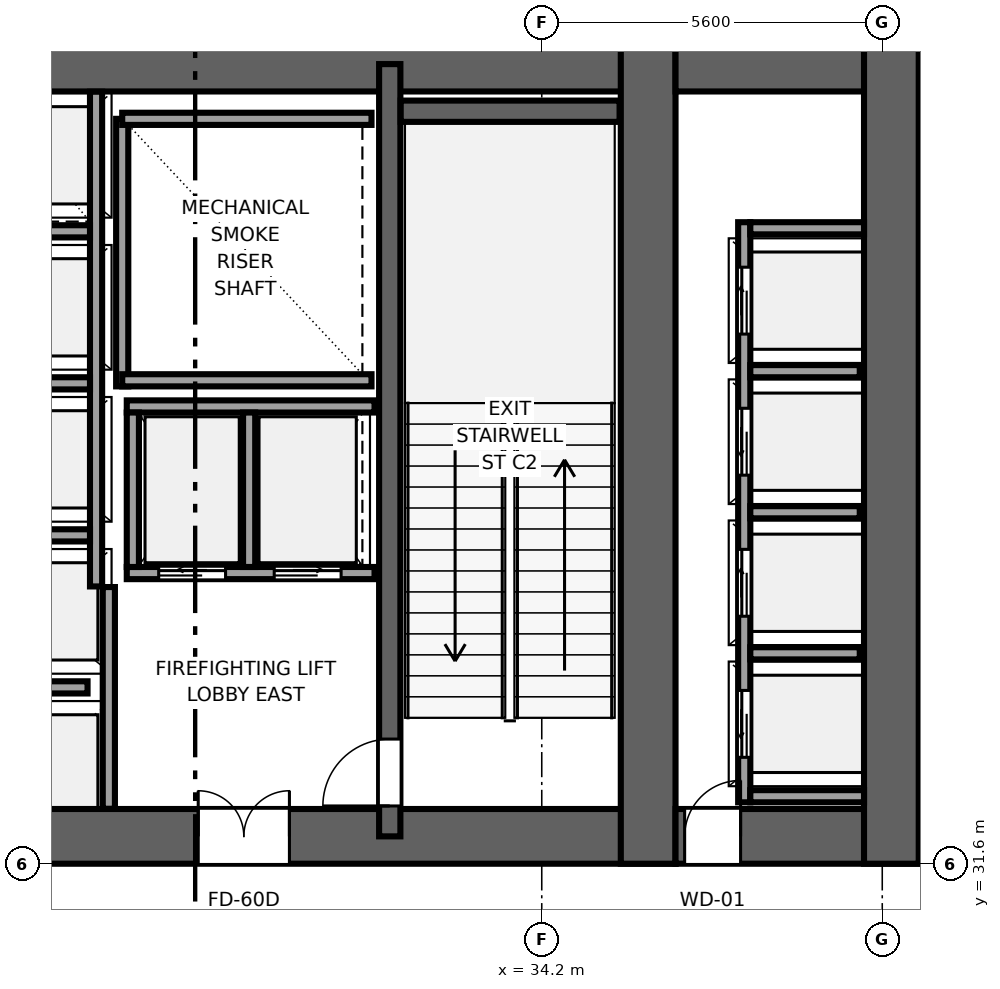
"""IFC4 building model, lengths in metres.
Left out: names, types, materials, properties, quantities, classifications, styles, units other than length and angle.
Written with IfcOpenShell. Run it as: python <this file> out.ifc"""

import sys

from ifc_helpers import new_model, si_unit, direction, frame, frame_2d, origin, place, context, subcontext, project, spatial, rectangle, extrude, source, transform, mapped, element, fill, save


model = new_model("IFC4")
c1 = context("Model", 3, precision=1e-05, world=origin(), true_north=direction((0.0, 1.0)))
c2 = subcontext(c1, "Body", "Model", "MODEL_VIEW")
j1 = project(units=[si_unit("LENGTHUNIT", "METRE"), si_unit("PLANEANGLEUNIT", "RADIAN")], contexts=[c1])
p1 = place(None, origin())
s1 = spatial("IfcSite", under=j1, at=p1, CompositionType="ELEMENT")
p2 = place(p1, origin())
s2 = spatial("IfcBuilding", under=s1, at=p2, CompositionType="ELEMENT")
p3 = place(p2, origin())
s3 = spatial("IfcBuildingStorey", under=s2, at=p3, CompositionType="ELEMENT", Elevation=0.0)
p4 = place(p3, frame((9.6, 32.05, 0.0), z_axis=(0.0, 0.0, 1.0), x_axis=(1.0, 0.0, 0.0)))
e1 = element("IfcWall", 1, at=p4, inside=s3, PredefinedType="SHEAR", context=c2, shape_type="SweptSolid", body=[
    extrude(rectangle(XDim=26.8, YDim=0.9, at=frame_2d((13.4, 0.0))), origin(), (0.0, 0.0, 1.0), 6.0),
])
p5 = place(p4, frame((7.85, 0.0, 0.0), z_axis=(0.0, 0.0, 1.0), x_axis=(-1.0, 0.0, 0.0)))
e2 = element("IfcOpeningElement", 2, at=p5, cuts=e1, PredefinedType="OPENING", context=c2, shape_type="SweptSolid", body=[
    extrude(rectangle(XDim=1.5, YDim=2.04, at=frame_2d((0.75, 1.02))), frame((0.0, 0.46, 0.0), z_axis=(0.0, -1.0, 0.0), x_axis=(1.0, 0.0, 0.0)), (0.0, 0.0, 1.0), 0.92),
])
p6 = place(p4, frame((14.15, 0.0, 0.0), z_axis=(0.0, 0.0, 1.0), x_axis=(-1.0, 0.0, 0.0)))
e3 = element("IfcOpeningElement", 3, at=p6, cuts=e1, PredefinedType="OPENING", context=c2, shape_type="SweptSolid", body=[
    extrude(rectangle(XDim=1.5, YDim=2.04, at=frame_2d((0.75, 1.02))), frame((0.0, 0.46, 0.0), z_axis=(0.0, -1.0, 0.0), x_axis=(1.0, 0.0, 0.0)), (0.0, 0.0, 1.0), 0.92),
])
p7 = place(p4, frame((20.45, 0.0, 0.0), z_axis=(0.0, 0.0, 1.0), x_axis=(-1.0, 0.0, 0.0)))
e4 = element("IfcOpeningElement", 4, at=p7, cuts=e1, PredefinedType="OPENING", context=c2, shape_type="SweptSolid", body=[
    extrude(rectangle(XDim=1.5, YDim=2.04, at=frame_2d((0.75, 1.02))), frame((0.0, 0.46, 0.0), z_axis=(0.0, -1.0, 0.0), x_axis=(1.0, 0.0, 0.0)), (0.0, 0.0, 1.0), 0.92),
])
p8 = place(p3, frame((9.6, 44.75, 0.0), z_axis=(0.0, 0.0, 1.0), x_axis=(1.0, 0.0, 0.0)))
e5 = element("IfcWall", 5, at=p8, inside=s3, PredefinedType="SHEAR", context=c2, shape_type="SweptSolid", body=[
    extrude(rectangle(XDim=26.8, YDim=0.9, at=frame_2d((13.4, 0.0))), origin(), (0.0, 0.0, 1.0), 6.0),
])
p9 = place(p3, frame((35.95, 31.6, 0.0), z_axis=(0.0, 0.0, 1.0), x_axis=(0.0, 1.0, 0.0)))
e6 = element("IfcWall", 6, at=p9, inside=s3, PredefinedType="SHEAR", context=c2, shape_type="SweptSolid", body=[
    extrude(rectangle(XDim=13.6, YDim=0.9, at=frame_2d((6.8, 0.0))), origin(), (0.0, 0.0, 1.0), 6.0),
])
p10 = place(p3, frame((31.7, 32.05, 0.0), z_axis=(0.0, 0.0, 1.0), x_axis=(0.0, 1.0, 0.0)))
e7 = element("IfcWall", 7, at=p10, inside=s3, PredefinedType="SHEAR", context=c2, shape_type="SweptSolid", body=[
    extrude(rectangle(XDim=12.7, YDim=0.35, at=frame_2d((6.35, 0.0))), origin(), (0.0, 0.0, 1.0), 6.0),
])
p11 = place(p10, frame((0.5, 0.0, 0.0)))
e8 = element("IfcOpeningElement", 8, at=p11, cuts=e7, PredefinedType="OPENING", context=c2, shape_type="SweptSolid", body=[
    extrude(rectangle(XDim=1.1, YDim=2.12, at=frame_2d((0.55, 1.06))), frame((0.0, 0.185, 0.0), z_axis=(0.0, -1.0, 0.0), x_axis=(1.0, 0.0, 0.0)), (0.0, 0.0, 1.0), 0.37),
])
p12 = place(p3, frame((36.4, 32.05, 0.0), z_axis=(0.0, 0.0, 1.0), x_axis=(1.0, 0.0, 0.0)))
e9 = element("IfcWall", 9, at=p12, inside=s3, PredefinedType="SHEAR", context=c2, shape_type="SweptSolid", body=[
    extrude(rectangle(XDim=4.0, YDim=0.9, at=frame_2d((2.0, 0.0))), origin(), (0.0, 0.0, 1.0), 6.0),
])
p13 = place(p12, frame((1.07, 0.0, 0.0), z_axis=(0.0, 0.0, 1.0), x_axis=(-1.0, 0.0, 0.0)))
e10 = element("IfcOpeningElement", 10, at=p13, cuts=e9, PredefinedType="OPENING", context=c2, shape_type="SweptSolid", body=[
    extrude(rectangle(XDim=0.92, YDim=2.01, at=frame_2d((0.46, 1.005))), frame((0.0, 0.46, 0.0), z_axis=(0.0, -1.0, 0.0), x_axis=(1.0, 0.0, 0.0)), (0.0, 0.0, 1.0), 0.92),
])
p14 = place(p3, frame((36.4, 44.75, 0.0), z_axis=(0.0, 0.0, 1.0), x_axis=(1.0, 0.0, 0.0)))
e11 = element("IfcWall", 11, at=p14, inside=s3, PredefinedType="SHEAR", context=c2, shape_type="SweptSolid", body=[
    extrude(rectangle(XDim=4.0, YDim=0.9, at=frame_2d((2.0, 0.0))), origin(), (0.0, 0.0, 1.0), 6.0),
])
p15 = place(p3, frame((39.95, 31.6, 0.0), z_axis=(0.0, 0.0, 1.0), x_axis=(0.0, 1.0, 0.0)))
e12 = element("IfcWall", 12, at=p15, inside=s3, PredefinedType="SHEAR", context=c2, shape_type="SweptSolid", body=[
    extrude(rectangle(XDim=13.6, YDim=0.9, at=frame_2d((6.8, 0.0))), origin(), (0.0, 0.0, 1.0), 6.0),
])
p16 = place(p3, frame((31.88, 43.975, 0.0), z_axis=(0.0, 0.0, 1.0), x_axis=(1.0, 0.0, 0.0)))
e13 = element("IfcWall", 13, at=p16, inside=s3, PredefinedType="SHEAR", context=c2, shape_type="SweptSolid", body=[
    extrude(rectangle(XDim=3.6, YDim=0.35, at=frame_2d((1.8, 0.0))), origin(), (0.0, 0.0, 1.0), 6.0),
])
p17 = place(p3, frame((27.3, 39.45, 0.0), z_axis=(0.0, 0.0, 1.0), x_axis=(0.0, 1.0, 0.0)))
e14 = element("IfcWall", 14, at=p17, inside=s3, PredefinedType="SOLIDWALL", context=c2, shape_type="SweptSolid", body=[
    extrude(rectangle(XDim=4.4, YDim=0.2, at=frame_2d((2.2, 0.0))), origin(), (0.0, 0.0, 1.0), 5.74),
])
for number, where, z_axis, x_axis in (
    (15, (27.3, 39.55, 0.0), (0.0, 0.0, 1.0), (1.0, 0.0, 0.0)),
    (16, (27.3, 43.85, 0.0), (0.0, 0.0, 1.0), (1.0, 0.0, 0.0)),
):
    element("IfcWall", number, at=place(p3, frame(where, z_axis=z_axis, x_axis=x_axis)), inside=s3, PredefinedType="SOLIDWALL", context=c2, shape_type="SweptSolid", body=[
        extrude(rectangle(XDim=4.1, YDim=0.2, at=frame_2d((2.05, 0.0))), origin(), (0.0, 0.0, 1.0), 5.74),
    ])
p18 = place(p3, frame((27.08, 32.504, 0.0), z_axis=(0.0, 0.0, 1.0), x_axis=(0.0, 1.0, 0.0)))
e17 = element("IfcWall", 17, at=p18, inside=s3, PredefinedType="SOLIDWALL", context=c2, shape_type="SweptSolid", body=[
    extrude(rectangle(XDim=3.646, YDim=0.2, at=frame_2d((1.823, 0.0))), origin(), (0.0, 0.0, 1.0), 5.74),
])
p19 = place(p3, frame((27.375, 36.38, 0.0), z_axis=(0.0, 0.0, 1.0), x_axis=(1.0, 0.0, 0.0)))
e18 = element("IfcWall", 18, at=p19, inside=s3, PredefinedType="SOLIDWALL", context=c2, shape_type="SweptSolid", body=[
    extrude(rectangle(XDim=4.075, YDim=0.2, at=frame_2d((2.038, 0.0))), origin(), (0.0, 0.0, 1.0), 5.74),
])
p20 = place(p19, frame((0.525, 0.0, 0.0)))
e19 = element("IfcOpeningElement", 19, at=p20, cuts=e18, PredefinedType="OPENING", context=c2, shape_type="SweptSolid", body=[
    extrude(rectangle(XDim=1.1, YDim=2.12, at=frame_2d((0.55, 1.06))), frame((0.0, 0.11, 0.0), z_axis=(0.0, -1.0, 0.0), x_axis=(1.0, 0.0, 0.0)), (0.0, 0.0, 1.0), 0.22),
])
p21 = place(p19, frame((2.425, 0.0, 0.0)))
e20 = element("IfcOpeningElement", 20, at=p21, cuts=e18, PredefinedType="OPENING", context=c2, shape_type="SweptSolid", body=[
    extrude(rectangle(XDim=1.1, YDim=2.12, at=frame_2d((0.55, 1.06))), frame((0.0, 0.11, 0.0), z_axis=(0.0, -1.0, 0.0), x_axis=(1.0, 0.0, 0.0)), (0.0, 0.0, 1.0), 0.22),
])
p22 = place(p3, frame((27.375, 39.12, 0.0), z_axis=(0.0, 0.0, 1.0), x_axis=(1.0, 0.0, 0.0)))
e21 = element("IfcWall", 21, at=p22, inside=s3, PredefinedType="SOLIDWALL", context=c2, shape_type="SweptSolid", body=[
    extrude(rectangle(XDim=4.075, YDim=0.2, at=frame_2d((2.038, 0.0))), origin(), (0.0, 0.0, 1.0), 5.74),
])
for number, where, z_axis, x_axis in (
    (22, (27.475, 36.48, 0.0), (0.0, 0.0, 1.0), (0.0, 1.0, 0.0)),
    (23, (29.387, 36.48, 0.0), (0.0, 0.0, 1.0), (0.0, 1.0, 0.0)),
):
    element("IfcWall", number, at=place(p3, frame(where, z_axis=z_axis, x_axis=x_axis)), inside=s3, PredefinedType="SOLIDWALL", context=c2, shape_type="SweptSolid", body=[
        extrude(rectangle(XDim=2.54, YDim=0.2, at=frame_2d((1.27, 0.0))), origin(), (0.0, 0.0, 1.0), 5.74),
    ])
p23 = place(p3, frame((26.87, 36.16, 0.0), z_axis=(0.0, 0.0, 1.0), x_axis=(0.0, 1.0, 0.0)))
e24 = element("IfcWall", 24, at=p23, inside=s3, PredefinedType="SOLIDWALL", context=c2, shape_type="SweptSolid", body=[
    extrude(rectangle(XDim=8.136, YDim=0.2, at=frame_2d((4.068, 0.0))), origin(), (0.0, 0.0, 1.0), 5.74),
])
p24 = place(p3, frame((24.93, 34.5, 0.0), z_axis=(0.0, 0.0, 1.0), x_axis=(1.0, 0.0, 0.0)))
e25 = element("IfcWall", 25, at=p24, inside=s3, PredefinedType="SOLIDWALL", context=c2, shape_type="SweptSolid", body=[
    extrude(rectangle(XDim=1.8, YDim=0.2, at=frame_2d((0.9, 0.0))), origin(), (0.0, 0.0, 1.0), 5.74),
])
for number, where, z_axis, x_axis in (
    (26, (24.93, 37.0, 0.0), (0.0, 0.0, 1.0), (1.0, 0.0, 0.0)),
    (27, (24.93, 39.5, 0.0), (0.0, 0.0, 1.0), (1.0, 0.0, 0.0)),
    (28, (24.93, 42.0, 0.0), (0.0, 0.0, 1.0), (1.0, 0.0, 0.0)),
):
    element("IfcWall", number, at=place(p3, frame(where, z_axis=z_axis, x_axis=x_axis)), inside=s3, PredefinedType="SOLIDWALL", context=c2, shape_type="SweptSolid", body=[
        extrude(rectangle(XDim=1.84, YDim=0.2, at=frame_2d((0.92, 0.0))), origin(), (0.0, 0.0, 1.0), 5.74),
    ])
p25 = place(p3, frame((37.53, 32.61, 0.0), z_axis=(0.0, 0.0, 1.0), x_axis=(0.0, 1.0, 0.0)))
e29 = element("IfcWall", 29, at=p25, inside=s3, PredefinedType="SOLIDWALL", context=c2, shape_type="SweptSolid", body=[
    extrude(rectangle(XDim=9.54, YDim=0.2, at=frame_2d((4.77, 0.0))), origin(), (0.0, 0.0, 1.0), 5.74),
])
p26 = place(p25, frame((0.74, 0.0, 0.0)))
e30 = element("IfcOpeningElement", 30, at=p26, cuts=e29, PredefinedType="OPENING", context=c2, shape_type="SweptSolid", body=[
    extrude(rectangle(XDim=1.1, YDim=2.12, at=frame_2d((0.55, 1.06))), frame((0.0, 0.11, 0.0), z_axis=(0.0, -1.0, 0.0), x_axis=(1.0, 0.0, 0.0)), (0.0, 0.0, 1.0), 0.22),
])
p27 = place(p25, frame((3.06, 0.0, 0.0)))
e31 = element("IfcOpeningElement", 31, at=p27, cuts=e29, PredefinedType="OPENING", context=c2, shape_type="SweptSolid", body=[
    extrude(rectangle(XDim=1.1, YDim=2.12, at=frame_2d((0.55, 1.06))), frame((0.0, 0.11, 0.0), z_axis=(0.0, -1.0, 0.0), x_axis=(1.0, 0.0, 0.0)), (0.0, 0.0, 1.0), 0.22),
])
p28 = place(p25, frame((5.38, 0.0, 0.0)))
e32 = element("IfcOpeningElement", 32, at=p28, cuts=e29, PredefinedType="OPENING", context=c2, shape_type="SweptSolid", body=[
    extrude(rectangle(XDim=1.1, YDim=2.12, at=frame_2d((0.55, 1.06))), frame((0.0, 0.11, 0.0), z_axis=(0.0, -1.0, 0.0), x_axis=(1.0, 0.0, 0.0)), (0.0, 0.0, 1.0), 0.22),
])
p29 = place(p25, frame((7.7, 0.0, 0.0)))
e33 = element("IfcOpeningElement", 33, at=p29, cuts=e29, PredefinedType="OPENING", context=c2, shape_type="SweptSolid", body=[
    extrude(rectangle(XDim=1.1, YDim=2.12, at=frame_2d((0.55, 1.06))), frame((0.0, 0.11, 0.0), z_axis=(0.0, -1.0, 0.0), x_axis=(1.0, 0.0, 0.0)), (0.0, 0.0, 1.0), 0.22),
])
for number, where, z_axis, x_axis in (
    (34, (37.63, 32.71, 0.0), (0.0, 0.0, 1.0), (1.0, 0.0, 0.0)),
    (35, (37.63, 42.05, 0.0), (0.0, 0.0, 1.0), (1.0, 0.0, 0.0)),
):
    element("IfcWall", number, at=place(p3, frame(where, z_axis=z_axis, x_axis=x_axis)), inside=s3, PredefinedType="SOLIDWALL", context=c2, shape_type="SweptSolid", body=[
        extrude(rectangle(XDim=1.87, YDim=0.2, at=frame_2d((0.935, 0.0))), origin(), (0.0, 0.0, 1.0), 5.74),
    ])
for number, where, z_axis, x_axis in (
    (36, (37.63, 35.06, 0.0), (0.0, 0.0, 1.0), (1.0, 0.0, 0.0)),
    (37, (37.63, 37.38, 0.0), (0.0, 0.0, 1.0), (1.0, 0.0, 0.0)),
    (38, (37.63, 39.7, 0.0), (0.0, 0.0, 1.0), (1.0, 0.0, 0.0)),
):
    element("IfcWall", number, at=place(p3, frame(where, z_axis=z_axis, x_axis=x_axis)), inside=s3, PredefinedType="SOLIDWALL", context=c2, shape_type="SweptSolid", body=[
        extrude(rectangle(XDim=1.8, YDim=0.2, at=frame_2d((0.9, 0.0))), origin(), (0.0, 0.0, 1.0), 5.74),
    ])
m1 = source(origin(), c2, "Body", "SweptSolid", [
    extrude(rectangle(XDim=1.1, YDim=2.12, at=frame_2d((0.55, 1.06))), frame((0.0, 0.025, 0.0), z_axis=(0.0, -1.0, 0.0), x_axis=(1.0, 0.0, 0.0)), (0.0, 0.0, 1.0), 0.05),
])
p30 = place(p11, origin())
e39 = element("IfcDoor", 39, at=p30, inside=s3, OperationType="SINGLE_SWING_LEFT", PredefinedType="DOOR", context=c2, shape_type="MappedRepresentation", body=[
    mapped(m1, transform((0.0, 0.0, 0.0), x_axis=(1.0, 0.0, 0.0), y_axis=(0.0, 1.0, 0.0), z_axis=(0.0, 0.0, 1.0), scale=1.0)),
])
fill(e8, e39)
m2 = source(origin(), c2, "Body", "SweptSolid", [
    extrude(rectangle(XDim=1.5, YDim=2.04, at=frame_2d((0.75, 1.02))), frame((0.0, 0.025, 0.0), z_axis=(0.0, -1.0, 0.0), x_axis=(1.0, 0.0, 0.0)), (0.0, 0.0, 1.0), 0.05),
])
p31 = place(p7, origin())
e40 = element("IfcDoor", 40, at=p31, inside=s3, OperationType="DOUBLE_DOOR_SINGLE_SWING", PredefinedType="DOOR", context=c2, shape_type="MappedRepresentation", body=[
    mapped(m2, transform((0.0, 0.0, 0.0), x_axis=(1.0, 0.0, 0.0), y_axis=(0.0, 1.0, 0.0), z_axis=(0.0, 0.0, 1.0), scale=1.0)),
])
fill(e4, e40)
m3 = source(origin(), c2, "Body", "SweptSolid", [
    extrude(rectangle(XDim=0.92, YDim=2.01, at=frame_2d((0.46, 1.005))), frame((0.0, 0.025, 0.0), z_axis=(0.0, -1.0, 0.0), x_axis=(1.0, 0.0, 0.0)), (0.0, 0.0, 1.0), 0.05),
])
p32 = place(p13, origin())
e41 = element("IfcDoor", 41, at=p32, inside=s3, OperationType="SINGLE_SWING_RIGHT", PredefinedType="DOOR", context=c2, shape_type="MappedRepresentation", body=[
    mapped(m3, transform((0.0, 0.0, 0.0), x_axis=(1.0, 0.0, 0.0), y_axis=(0.0, 1.0, 0.0), z_axis=(0.0, 0.0, 1.0), scale=1.0)),
])
fill(e10, e41)
m4 = source(origin(), c2, "Body", "SweptSolid", [
    extrude(rectangle(XDim=1.1, YDim=2.12, at=frame_2d((0.55, 1.06))), frame((0.0, 0.025, 0.0), z_axis=(0.0, -1.0, 0.0), x_axis=(1.0, 0.0, 0.0)), (0.0, 0.0, 1.0), 0.05),
])
p33 = place(p20, origin())
e42 = element("IfcDoor", 42, at=p33, inside=s3, OperationType="SLIDING_TO_LEFT", PredefinedType="DOOR", context=c2, shape_type="MappedRepresentation", body=[
    mapped(m4, transform((0.0, 0.0, 0.0), x_axis=(1.0, 0.0, 0.0), y_axis=(0.0, 1.0, 0.0), z_axis=(0.0, 0.0, 1.0), scale=1.0)),
])
fill(e19, e42)
p34 = place(p21, origin())
e43 = element("IfcDoor", 43, at=p34, inside=s3, OperationType="SLIDING_TO_RIGHT", PredefinedType="DOOR", context=c2, shape_type="MappedRepresentation", body=[
    mapped(m4, transform((0.0, 0.0, 0.0), x_axis=(1.0, 0.0, 0.0), y_axis=(0.0, 1.0, 0.0), z_axis=(0.0, 0.0, 1.0), scale=1.0)),
])
fill(e20, e43)
p35 = place(p26, origin())
e44 = element("IfcDoor", 44, at=p35, inside=s3, OperationType="SLIDING_TO_LEFT", PredefinedType="DOOR", context=c2, shape_type="MappedRepresentation", body=[
    mapped(m4, transform((0.0, 0.0, 0.0), x_axis=(1.0, 0.0, 0.0), y_axis=(0.0, 1.0, 0.0), z_axis=(0.0, 0.0, 1.0), scale=1.0)),
])
fill(e30, e44)
p36 = place(p27, origin())
e45 = element("IfcDoor", 45, at=p36, inside=s3, OperationType="SLIDING_TO_RIGHT", PredefinedType="DOOR", context=c2, shape_type="MappedRepresentation", body=[
    mapped(m4, transform((0.0, 0.0, 0.0), x_axis=(1.0, 0.0, 0.0), y_axis=(0.0, 1.0, 0.0), z_axis=(0.0, 0.0, 1.0), scale=1.0)),
])
fill(e31, e45)
p37 = place(p28, origin())
e46 = element("IfcDoor", 46, at=p37, inside=s3, OperationType="SLIDING_TO_LEFT", PredefinedType="DOOR", context=c2, shape_type="MappedRepresentation", body=[
    mapped(m4, transform((0.0, 0.0, 0.0), x_axis=(1.0, 0.0, 0.0), y_axis=(0.0, 1.0, 0.0), z_axis=(0.0, 0.0, 1.0), scale=1.0)),
])
fill(e32, e46)
p38 = place(p29, origin())
e47 = element("IfcDoor", 47, at=p38, inside=s3, OperationType="SLIDING_TO_RIGHT", PredefinedType="DOOR", context=c2, shape_type="MappedRepresentation", body=[
    mapped(m4, transform((0.0, 0.0, 0.0), x_axis=(1.0, 0.0, 0.0), y_axis=(0.0, 1.0, 0.0), z_axis=(0.0, 0.0, 1.0), scale=1.0)),
])
fill(e33, e47)
save(model, sys.argv[1])
